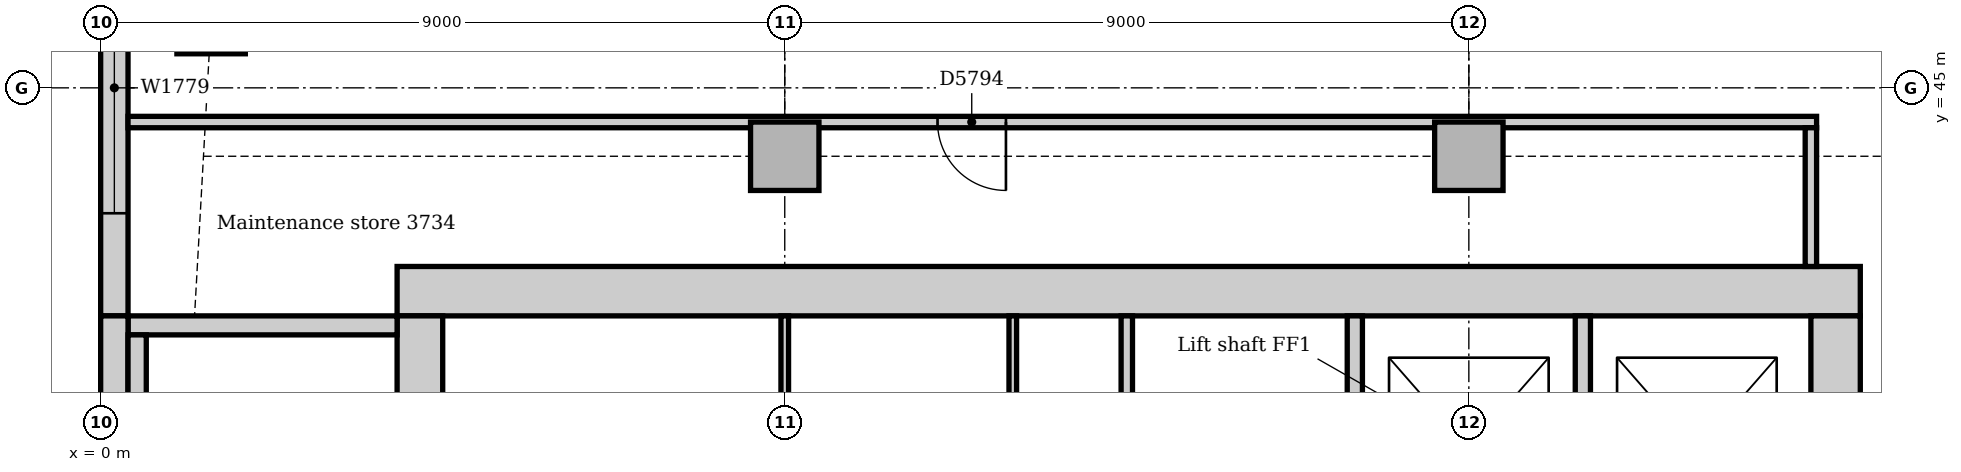
"""IFC4 building model, lengths in metres.
Left out: names, types, materials, properties, quantities, classifications, styles, units other than length and angle.
Written with IfcOpenShell. Run it as: python <this file> out.ifc"""

import sys

from ifc_helpers import new_model, si_unit, direction, frame, frame_2d, origin, origin_2d, place, context, subcontext, project, spatial, rectangle, extrude, element, fill, save


model = new_model("IFC4")
c1 = context("Model", 3, precision=1e-05, world=origin(), true_north=direction((0.0, 1.0)))
c2 = subcontext(c1, "Body", "Model", "MODEL_VIEW")
j1 = project(units=[si_unit("LENGTHUNIT", "METRE"), si_unit("PLANEANGLEUNIT", "RADIAN")], contexts=[c1])
p1 = place(None, origin())
s1 = spatial("IfcSite", under=j1, at=p1, CompositionType="ELEMENT")
p2 = place(p1, origin())
s2 = spatial("IfcBuilding", under=s1, at=p2, CompositionType="ELEMENT")
p3 = place(p2, frame((0.0, 0.0, 157.0)))
s3 = spatial("IfcBuildingStorey", under=s2, at=p3, CompositionType="ELEMENT", Elevation=157.0)
p4 = place(p3, frame((23.15, 42.325, 0.0), z_axis=(0.0, 0.0, 1.0), x_axis=(-1.0, 0.0, 0.0)))
e1 = element("IfcWall", 1, at=p4, inside=s3, PredefinedType="SOLIDWALL", context=c2, shape_type="SweptSolid", body=[
    extrude(rectangle(XDim=19.25, YDim=0.65, at=frame_2d((9.625, 0.0))), origin(), (0.0, 0.0, 1.0), 4.0),
])
p5 = place(p3, frame((22.825, 31.5, 0.0), z_axis=(0.0, 0.0, 1.0), x_axis=(0.0, 1.0, 0.0)))
e2 = element("IfcWall", 2, at=p5, inside=s3, PredefinedType="SOLIDWALL", context=c2, shape_type="SweptSolid", body=[
    extrude(rectangle(XDim=10.5, YDim=0.65, at=frame_2d((5.25, 0.0))), origin(), (0.0, 0.0, 1.0), 4.0),
])
p6 = place(p5, frame((3.15, 0.0, 0.0)))
e3 = element("IfcOpeningElement", 3, at=p6, cuts=e2, PredefinedType="OPENING", context=c2, shape_type="SweptSolid", body=[
    extrude(rectangle(XDim=1.0, YDim=2.1, at=frame_2d((0.5, 1.05))), frame((0.0, 0.335, 0.0), z_axis=(0.0, -1.0, 0.0), x_axis=(1.0, 0.0, 0.0)), (0.0, 0.0, 1.0), 0.67),
])
p7 = place(p5, frame((5.2, 0.0, 0.0)))
e4 = element("IfcOpeningElement", 4, at=p7, cuts=e2, PredefinedType="OPENING", context=c2, shape_type="SweptSolid", body=[
    extrude(rectangle(XDim=1.0, YDim=2.1, at=frame_2d((0.5, 1.05))), frame((0.0, 0.335, 0.0), z_axis=(0.0, -1.0, 0.0), x_axis=(1.0, 0.0, 0.0)), (0.0, 0.0, 1.0), 0.67),
])
p8 = place(p3, frame((4.2, 42.0, 0.0), z_axis=(0.0, 0.0, 1.0), x_axis=(0.0, -1.0, 0.0)))
e5 = element("IfcWall", 5, at=p8, inside=s3, PredefinedType="SOLIDWALL", context=c2, shape_type="SweptSolid", body=[
    extrude(rectangle(XDim=10.5, YDim=0.6, at=frame_2d((5.25, 0.0))), origin(), (0.0, 0.0, 1.0), 4.0),
])
p9 = place(p8, frame((5.3, 0.0, 0.0)))
e6 = element("IfcOpeningElement", 6, at=p9, cuts=e5, PredefinedType="OPENING", context=c2, shape_type="SweptSolid", body=[
    extrude(rectangle(XDim=1.0, YDim=2.1, at=frame_2d((0.5, 1.05))), frame((0.0, 0.31, 0.0), z_axis=(0.0, -1.0, 0.0), x_axis=(1.0, 0.0, 0.0)), (0.0, 0.0, 1.0), 0.62),
])
p10 = place(p3, frame((3.9, 41.875, 0.0), z_axis=(0.0, 0.0, 1.0), x_axis=(-1.0, 0.0, 0.0)))
e7 = element("IfcWall", 7, at=p10, inside=s3, PredefinedType="SOLIDWALL", context=c2, shape_type="SweptSolid", body=[
    extrude(rectangle(XDim=3.54, YDim=0.25, at=frame_2d((1.77, 0.0))), origin(), (0.0, 0.0, 1.0), 4.0),
])
for number, where, z_axis, x_axis in (
    (8, (1.453, 45.898, 0.0), (0.0, 0.0, 1.0), (1.0, 0.0, 0.0)),
    (9, (9.0, 44.1, 0.0), (0.0, 0.0, 1.0), (1.0, 0.0, 0.0)),
    (10, (18.0, 44.1, 0.0), (0.0, 0.0, 1.0), (1.0, 0.0, 0.0)),
):
    element("IfcColumn", number, at=place(p3, frame(where, z_axis=z_axis, x_axis=x_axis)), inside=s3, PredefinedType="COLUMN", context=c2, shape_type="SweptSolid", body=[
        extrude(rectangle(XDim=0.9, YDim=0.9, at=origin_2d()), origin(), (0.0, 0.0, 1.0), 3.85),
    ])
p11 = place(p3, frame((0.18, 49.757, 0.0), z_axis=(0.0, 0.0, 1.0), x_axis=(0.0, -1.0, 0.0)))
e11 = element("IfcWall", 11, at=p11, inside=s3, PredefinedType="STANDARD", context=c2, shape_type="SweptSolid", body=[
    extrude(rectangle(XDim=7.757, YDim=0.36, at=frame_2d((3.879, 0.0))), origin(), (0.0, 0.0, 1.0), 3.85),
])
p12 = place(p11, frame((3.107, 0.0, 0.9)))
e12 = element("IfcOpeningElement", 12, at=p12, cuts=e11, PredefinedType="OPENING", context=c2, shape_type="SweptSolid", body=[
    extrude(rectangle(XDim=3.3, YDim=1.6, at=frame_2d((1.65, 0.8))), frame((0.0, 0.19, 0.0), z_axis=(0.0, -1.0, 0.0), x_axis=(1.0, 0.0, 0.0)), (0.0, 0.0, 1.0), 0.38),
])
p13 = place(p3, frame((0.18, 42.0, 0.0), z_axis=(0.0, 0.0, 1.0), x_axis=(0.0, -1.0, 0.0)))
e13 = element("IfcWall", 13, at=p13, inside=s3, PredefinedType="STANDARD", context=c2, shape_type="SweptSolid", body=[
    extrude(rectangle(XDim=6.75, YDim=0.36, at=frame_2d((3.375, 0.0))), origin(), (0.0, 0.0, 1.0), 3.85),
])
p14 = place(p3, frame((0.48, 40.13, 0.0), z_axis=(0.0, 0.0, 1.0), x_axis=(0.0, 1.0, 0.0)))
e14 = element("IfcWall", 14, at=p14, inside=s3, PredefinedType="STANDARD", context=c2, shape_type="SweptSolid", body=[
    extrude(rectangle(XDim=1.62, YDim=0.24, at=frame_2d((0.81, 0.0))), origin(), (0.0, 0.0, 1.0), 4.0),
])
for number, where, z_axis, x_axis in (
    (15, (16.5, 38.6, 0.0), (0.0, 0.0, 1.0), (0.0, 1.0, 0.0)),
    (16, (19.5, 38.6, 0.0), (0.0, 0.0, 1.0), (0.0, 1.0, 0.0)),
):
    element("IfcWall", number, at=place(p3, frame(where, z_axis=z_axis, x_axis=x_axis)), inside=s3, PredefinedType="PARTITIONING", context=c2, shape_type="SweptSolid", body=[
        extrude(rectangle(XDim=3.4, YDim=0.2, at=frame_2d((1.7, 0.0))), origin(), (0.0, 0.0, 1.0), 3.85),
    ])
p15 = place(p3, frame((0.36, 44.55, 0.0), z_axis=(0.0, 0.0, 1.0), x_axis=(1.0, 0.0, 0.0)))
e17 = element("IfcWall", 17, at=p15, inside=s3, PredefinedType="PARTITIONING", context=c2, shape_type="SweptSolid", body=[
    extrude(rectangle(XDim=22.215, YDim=0.15, at=frame_2d((11.107, 0.0))), origin(), (0.0, 0.0, 1.0), 3.85),
])
p16 = place(p15, frame((10.65, 0.0, 0.0)))
e18 = element("IfcOpeningElement", 18, at=p16, cuts=e17, PredefinedType="OPENING", context=c2, shape_type="SweptSolid", body=[
    extrude(rectangle(XDim=0.9, YDim=2.1, at=frame_2d((0.45, 1.05))), frame((0.0, 0.085, 0.0), z_axis=(0.0, -1.0, 0.0), x_axis=(1.0, 0.0, 0.0)), (0.0, 0.0, 1.0), 0.17),
])
p17 = place(p3, frame((22.5, 42.65, 0.0), z_axis=(0.0, 0.0, 1.0), x_axis=(0.0, 1.0, 0.0)))
e19 = element("IfcWall", 19, at=p17, inside=s3, PredefinedType="PARTITIONING", context=c2, shape_type="SweptSolid", body=[
    extrude(rectangle(XDim=1.825, YDim=0.15, at=frame_2d((0.912, 0.0))), origin(), (0.0, 0.0, 1.0), 3.85),
])
p18 = place(p3, frame((13.5, 38.575, 0.0), z_axis=(0.0, 0.0, 1.0), x_axis=(0.0, 1.0, 0.0)))
e20 = element("IfcWall", 20, at=p18, inside=s3, PredefinedType="PARTITIONING", context=c2, shape_type="SweptSolid", body=[
    extrude(rectangle(XDim=3.425, YDim=0.15, at=frame_2d((1.712, 0.0))), origin(), (0.0, 0.0, 1.0), 3.85),
])
for number, where, z_axis, x_axis in (
    (21, (9.0, 38.575, 0.0), (0.0, 0.0, 1.0), (0.0, 1.0, 0.0)),
    (22, (12.0, 38.575, 0.0), (0.0, 0.0, 1.0), (0.0, 1.0, 0.0)),
):
    element("IfcWall", number, at=place(p3, frame(where, z_axis=z_axis, x_axis=x_axis)), inside=s3, PredefinedType="PARTITIONING", context=c2, shape_type="SweptSolid", body=[
        extrude(rectangle(XDim=3.425, YDim=0.1, at=frame_2d((1.712, 0.0))), origin(), (0.0, 0.0, 1.0), 3.85),
    ])
p19 = place(p12, origin())
e23 = element("IfcWindow", 23, at=p19, inside=s3, PartitioningType="SINGLE_PANEL", PredefinedType="WINDOW", context=c2, shape_type="SweptSolid", body=[
    extrude(rectangle(XDim=3.3, YDim=1.6, at=frame_2d((1.65, 0.8))), frame((0.0, 0.13, 0.0), z_axis=(0.0, -1.0, 0.0), x_axis=(1.0, 0.0, 0.0)), (0.0, 0.0, 1.0), 0.06),
])
fill(e12, e23)
p20 = place(p16, frame((0.9, 0.0, 0.0), z_axis=(0.0, 0.0, 1.0), x_axis=(-1.0, 0.0, 0.0)))
e24 = element("IfcDoor", 24, at=p20, inside=s3, OperationType="SINGLE_SWING_LEFT", PredefinedType="DOOR", context=c2, shape_type="SweptSolid", body=[
    extrude(rectangle(XDim=0.9, YDim=2.1, at=frame_2d((0.45, 1.05))), frame((0.0, 0.025, 0.0), z_axis=(0.0, -1.0, 0.0), x_axis=(1.0, 0.0, 0.0)), (0.0, 0.0, 1.0), 0.05),
])
fill(e18, e24)
save(model, sys.argv[1])
